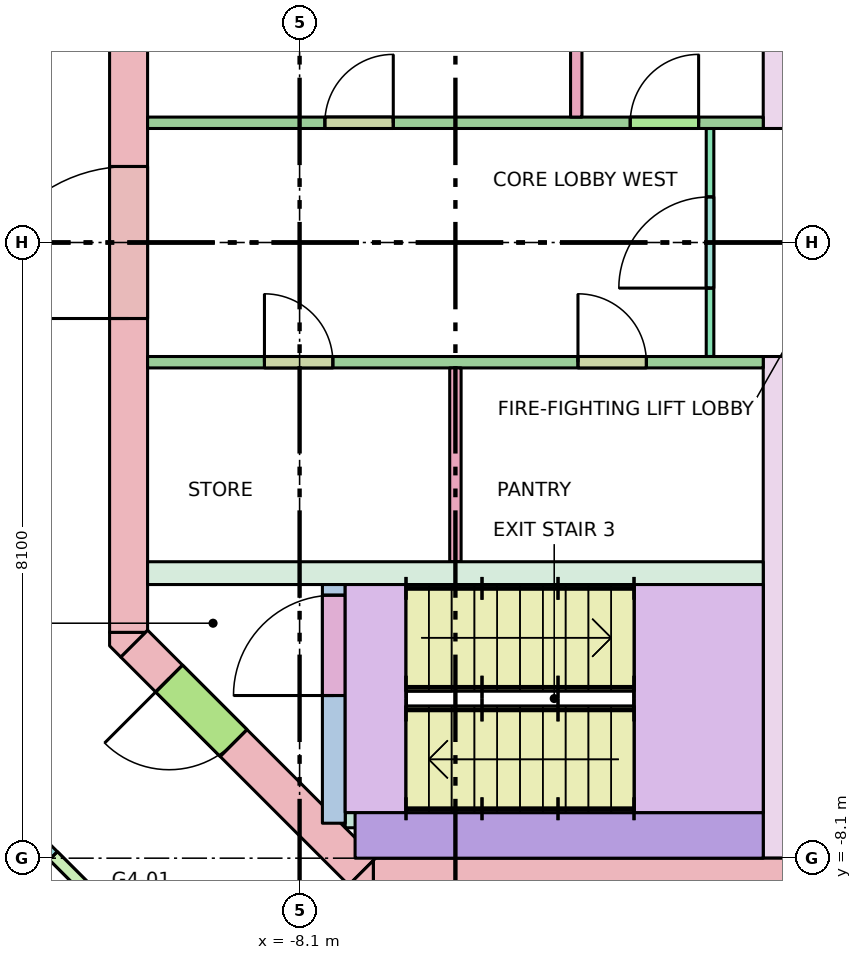
"""IFC4 building model, lengths in metres.
Left out: names, types, materials, properties, quantities, classifications, styles, units other than length and angle.
Written with IfcOpenShell. Run it as: python <this file> out.ifc"""

import sys

from ifc_helpers import new_model, si_unit, direction, frame, frame_2d, origin, place, context, subcontext, project, spatial, polyline, rectangle, outline, extrude, element, fill, save


model = new_model("IFC4")
c1 = context("Model", 3, precision=1e-05, world=origin(), true_north=direction((0.0, 1.0)))
c2 = subcontext(c1, "Body", "Model", "MODEL_VIEW")
j1 = project(units=[si_unit("LENGTHUNIT", "METRE"), si_unit("PLANEANGLEUNIT", "RADIAN")], contexts=[c1])
p1 = place(None, origin())
s1 = spatial("IfcSite", under=j1, at=p1, CompositionType="ELEMENT")
p2 = place(p1, origin())
s2 = spatial("IfcBuilding", under=s1, at=p2, CompositionType="ELEMENT")
p3 = place(p2, frame((0.0, 0.0, 276.0)))
s3 = spatial("IfcBuildingStorey", under=s2, at=p3, CompositionType="ELEMENT", Elevation=276.0)
p4 = place(p3, frame((-7.13, -8.35, -0.28), z_axis=(0.0, 0.0, 1.0), x_axis=(1.0, 0.0, 0.0)))
e1 = element("IfcWall", 1, at=p4, inside=s3, PredefinedType="SHEAR", context=c2, shape_type="SweptSolid", body=[
    extrude(rectangle(XDim=14.26, YDim=0.5, at=frame_2d((7.13, 0.0))), origin(), (0.0, 0.0, 1.0), 7.4),
])
p5 = place(p4, frame((8.08, 0.0, 0.28)))
e2 = element("IfcOpeningElement", 2, at=p5, cuts=e1, PredefinedType="OPENING", context=c2, shape_type="SweptSolid", body=[
    extrude(rectangle(XDim=0.7, YDim=2.1, at=frame_2d((0.35, 1.05))), frame((0.0, 0.26, 0.0), z_axis=(0.0, -1.0, 0.0), x_axis=(1.0, 0.0, 0.0)), (0.0, 0.0, 1.0), 0.52),
])
p6 = place(p4, frame((6.205, 0.0, 0.28)))
e3 = element("IfcOpeningElement", 3, at=p6, cuts=e1, PredefinedType="OPENING", context=c2, shape_type="SweptSolid", body=[
    extrude(rectangle(XDim=0.9, YDim=2.1, at=frame_2d((0.45, 1.05))), frame((0.0, 0.26, 0.0), z_axis=(0.0, -1.0, 0.0), x_axis=(1.0, 0.0, 0.0)), (0.0, 0.0, 1.0), 0.52),
])
p7 = place(p4, frame((10.667, 0.0, 0.28)))
e4 = element("IfcOpeningElement", 4, at=p7, cuts=e1, PredefinedType="OPENING", context=c2, shape_type="SweptSolid", body=[
    extrude(rectangle(XDim=0.9, YDim=2.1, at=frame_2d((0.45, 1.05))), frame((0.0, 0.26, 0.0), z_axis=(0.0, -1.0, 0.0), x_axis=(1.0, 0.0, 0.0)), (0.0, 0.0, 1.0), 0.52),
])
p8 = place(p3, frame((-10.35, -5.13, -0.28), z_axis=(0.0, 0.0, 1.0), x_axis=(0.0, 1.0, 0.0)))
e5 = element("IfcWall", 5, at=p8, inside=s3, PredefinedType="SHEAR", context=c2, shape_type="SweptSolid", body=[
    extrude(rectangle(XDim=10.26, YDim=0.5, at=frame_2d((5.13, 0.0))), origin(), (0.0, 0.0, 1.0), 7.4),
])
p9 = place(p8, frame((4.13, 0.0, 0.28)))
e6 = element("IfcOpeningElement", 6, at=p9, cuts=e5, PredefinedType="OPENING", context=c2, shape_type="SweptSolid", body=[
    extrude(rectangle(XDim=2.0, YDim=2.1, at=frame_2d((1.0, 1.05))), frame((0.0, 0.26, 0.0), z_axis=(0.0, -1.0, 0.0), x_axis=(1.0, 0.0, 0.0)), (0.0, 0.0, 1.0), 0.52),
])
p10 = place(p3, frame((-7.277, -8.277, -0.28), z_axis=(0.0, 0.0, 1.0), x_axis=(-0.707106781187, 0.707106781187, 0.0)))
e7 = element("IfcWall", 7, at=p10, inside=s3, PredefinedType="SHEAR", context=c2, shape_type="SweptSolid", body=[
    extrude(rectangle(XDim=4.243, YDim=0.5, at=frame_2d((2.121, 0.0))), origin(), (0.0, 0.0, 1.0), 7.4),
])
p11 = place(p10, frame((2.393, 0.0, 0.28)))
e8 = element("IfcOpeningElement", 8, at=p11, cuts=e7, PredefinedType="OPENING", context=c2, shape_type="SweptSolid", body=[
    extrude(rectangle(XDim=1.2, YDim=2.1, at=frame_2d((0.6, 1.05))), frame((0.0, 0.26, 0.0), z_axis=(0.0, -1.0, 0.0), x_axis=(1.0, 0.0, 0.0)), (0.0, 0.0, 1.0), 0.52),
])
p12 = place(p3, frame((0.0, 0.0, -0.28)))
e9 = element("IfcWall", 9, at=p12, inside=s3, PredefinedType="SHEAR", context=c2, shape_type="SweptSolid", body=[
    extrude(outline(polyline([(-7.307, -8.6), (-7.454, -8.454), (-7.13, -8.13), (-7.13, -8.6), (-7.307, -8.6)])), origin(), (0.0, 0.0, 1.0), 7.4),
])
p13 = place(p3, frame((0.0, 0.0, -0.28)))
e10 = element("IfcWall", 10, at=p13, inside=s3, PredefinedType="SHEAR", context=c2, shape_type="SweptSolid", body=[
    extrude(outline(polyline([(-10.6, -5.307), (-10.6, -5.13), (-10.13, -5.13), (-10.454, -5.454), (-10.6, -5.307)])), origin(), (0.0, 0.0, 1.0), 7.4),
])
p14 = place(p3, frame((-10.1, -4.35, 0.0), z_axis=(0.0, 0.0, 1.0), x_axis=(1.0, 0.0, 0.0)))
e11 = element("IfcWall", 11, at=p14, inside=s3, PredefinedType="SOLIDWALL", context=c2, shape_type="SweptSolid", body=[
    extrude(rectangle(XDim=8.1, YDim=0.3, at=frame_2d((4.05, 0.0))), origin(), (0.0, 0.0, 1.0), 7.12),
])
for number, where, z_axis, x_axis in (
    (12, (-1.85, 1.5, 0.0), (0.0, 0.0, 1.0), (0.0, 1.0, 0.0)),
    (13, (-1.85, -8.1, 0.0), (0.0, 0.0, 1.0), (0.0, 1.0, 0.0)),
):
    element("IfcWall", number, at=place(p3, frame(where, z_axis=z_axis, x_axis=x_axis)), inside=s3, PredefinedType="SHEAR", context=c2, shape_type="SweptSolid", body=[
        extrude(rectangle(XDim=6.6, YDim=0.3, at=frame_2d((3.3, 0.0))), origin(), (0.0, 0.0, 1.0), 7.12),
    ])
p15 = place(p3, frame((-7.65, -7.64, 0.0), z_axis=(0.0, 0.0, 1.0), x_axis=(0.0, 1.0, 0.0)))
e14 = element("IfcWall", 14, at=p15, inside=s3, PredefinedType="SHEAR", context=c2, shape_type="SweptSolid", body=[
    extrude(rectangle(XDim=3.14, YDim=0.3, at=frame_2d((1.57, 0.0))), origin(), (0.0, 0.0, 1.0), 7.12),
])
p16 = place(p15, frame((1.68, 0.0, 0.0)))
e15 = element("IfcOpeningElement", 15, at=p16, cuts=e14, PredefinedType="OPENING", context=c2, shape_type="SweptSolid", body=[
    extrude(rectangle(XDim=1.32, YDim=2.1, at=frame_2d((0.66, 1.05))), frame((0.0, 0.16, 0.0), z_axis=(0.0, -1.0, 0.0), x_axis=(1.0, 0.0, 0.0)), (0.0, 0.0, 1.0), 0.32),
])
p17 = place(p3, frame((-7.5, -7.6, 0.0), z_axis=(0.0, 0.0, 1.0), x_axis=(1.0, 0.0, 0.0)))
e16 = element("IfcWall", 16, at=p17, inside=s3, PredefinedType="SHEAR", context=c2, shape_type="SweptSolid", body=[
    extrude(rectangle(XDim=0.6, YDim=0.2, at=frame_2d((0.3, 0.0))), origin(), (0.0, 0.0, 1.0), 7.12),
])
p18 = place(p3, frame((-7.37, -7.8, 0.0), z_axis=(0.0, 0.0, 1.0), x_axis=(1.0, 0.0, 0.0)))
e17 = element("IfcWall", 17, at=p18, inside=s3, PredefinedType="SHEAR", context=c2, shape_type="SweptSolid", body=[
    extrude(rectangle(XDim=5.37, YDim=0.6, at=frame_2d((2.685, 0.0))), origin(), (0.0, 0.0, 1.0), 7.12),
])
p19 = place(p3, frame((-2.7, -1.5, 0.0), z_axis=(0.0, 0.0, 1.0), x_axis=(0.0, 1.0, 0.0)))
e18 = element("IfcWall", 18, at=p19, inside=s3, PredefinedType="PARTITIONING", context=c2, shape_type="SweptSolid", body=[
    extrude(rectangle(XDim=3.0, YDim=0.1, at=frame_2d((1.5, 0.0))), origin(), (0.0, 0.0, 1.0), 7.12),
])
p20 = place(p19, frame((0.9, 0.0, 0.0)))
e19 = element("IfcOpeningElement", 19, at=p20, cuts=e18, PredefinedType="OPENING", context=c2, shape_type="SweptSolid", body=[
    extrude(rectangle(XDim=1.2, YDim=2.1, at=frame_2d((0.6, 1.05))), frame((0.0, 0.06, 0.0), z_axis=(0.0, -1.0, 0.0), x_axis=(1.0, 0.0, 0.0)), (0.0, 0.0, 1.0), 0.12),
])
for number, where, z_axis, x_axis in (
    (20, (-4.46, 1.65, 0.0), (0.0, 0.0, 1.0), (0.0, 1.0, 0.0)),
    (21, (-6.05, -4.2, 0.0), (0.0, 0.0, 1.0), (0.0, 1.0, 0.0)),
):
    element("IfcWall", number, at=place(p3, frame(where, z_axis=z_axis, x_axis=x_axis)), inside=s3, PredefinedType="PARTITIONING", context=c2, shape_type="SweptSolid", body=[
        extrude(rectangle(XDim=2.55, YDim=0.15, at=frame_2d((1.275, 0.0))), origin(), (0.0, 0.0, 1.0), 7.12),
    ])
p21 = place(p3, frame((-10.1, 1.575, 0.0), z_axis=(0.0, 0.0, 1.0), x_axis=(1.0, 0.0, 0.0)))
e22 = element("IfcWall", 22, at=p21, inside=s3, PredefinedType="PARTITIONING", context=c2, shape_type="SweptSolid", body=[
    extrude(rectangle(XDim=8.1, YDim=0.15, at=frame_2d((4.05, 0.0))), origin(), (0.0, 0.0, 1.0), 7.12),
])
p22 = place(p21, frame((2.333, 0.0, 0.0)))
e23 = element("IfcOpeningElement", 23, at=p22, cuts=e22, PredefinedType="OPENING", context=c2, shape_type="SweptSolid", body=[
    extrude(rectangle(XDim=0.9, YDim=2.1, at=frame_2d((0.45, 1.05))), frame((0.0, 0.085, 0.0), z_axis=(0.0, -1.0, 0.0), x_axis=(1.0, 0.0, 0.0)), (0.0, 0.0, 1.0), 0.17),
])
p23 = place(p21, frame((6.35, 0.0, 0.0)))
e24 = element("IfcOpeningElement", 24, at=p23, cuts=e22, PredefinedType="OPENING", context=c2, shape_type="SweptSolid", body=[
    extrude(rectangle(XDim=0.9, YDim=2.1, at=frame_2d((0.45, 1.05))), frame((0.0, 0.085, 0.0), z_axis=(0.0, -1.0, 0.0), x_axis=(1.0, 0.0, 0.0)), (0.0, 0.0, 1.0), 0.17),
])
p24 = place(p3, frame((-10.1, -1.575, 0.0), z_axis=(0.0, 0.0, 1.0), x_axis=(1.0, 0.0, 0.0)))
e25 = element("IfcWall", 25, at=p24, inside=s3, PredefinedType="PARTITIONING", context=c2, shape_type="SweptSolid", body=[
    extrude(rectangle(XDim=8.1, YDim=0.15, at=frame_2d((4.05, 0.0))), origin(), (0.0, 0.0, 1.0), 7.12),
])
p25 = place(p24, frame((1.538, 0.0, 0.0)))
e26 = element("IfcOpeningElement", 26, at=p25, cuts=e25, PredefinedType="OPENING", context=c2, shape_type="SweptSolid", body=[
    extrude(rectangle(XDim=0.9, YDim=2.1, at=frame_2d((0.45, 1.05))), frame((0.0, 0.085, 0.0), z_axis=(0.0, -1.0, 0.0), x_axis=(1.0, 0.0, 0.0)), (0.0, 0.0, 1.0), 0.17),
])
p26 = place(p24, frame((5.663, 0.0, 0.0)))
e27 = element("IfcOpeningElement", 27, at=p26, cuts=e25, PredefinedType="OPENING", context=c2, shape_type="SweptSolid", body=[
    extrude(rectangle(XDim=0.9, YDim=2.1, at=frame_2d((0.45, 1.05))), frame((0.0, 0.085, 0.0), z_axis=(0.0, -1.0, 0.0), x_axis=(1.0, 0.0, 0.0)), (0.0, 0.0, 1.0), 0.17),
])
p27 = place(p3, frame((-8.369, -11.038, 0.0), z_axis=(0.0, 0.0, 1.0), x_axis=(-0.707106781187, 0.707106781187, 0.0)))
e28 = element("IfcWall", 28, at=p27, inside=s3, PredefinedType="PARTITIONING", context=c2, shape_type="SweptSolid", body=[
    extrude(rectangle(XDim=6.602, YDim=0.15, at=frame_2d((3.301, 0.0))), origin(), (0.0, 0.0, 1.0), 6.27),
])
p28 = place(p27, frame((2.401, 0.0, 0.0)))
e29 = element("IfcOpeningElement", 29, at=p28, cuts=e28, PredefinedType="OPENING", context=c2, shape_type="SweptSolid", body=[
    extrude(rectangle(XDim=1.8, YDim=2.1, at=frame_2d((0.9, 1.05))), frame((0.0, 0.085, 0.0), z_axis=(0.0, -1.0, 0.0), x_axis=(1.0, 0.0, 0.0)), (0.0, 0.0, 1.0), 0.17),
])
p29 = place(p16, origin())
e30 = element("IfcDoor", 30, at=p29, inside=s3, OperationType="DOUBLE_DOOR_SINGLE_SWING", PredefinedType="DOOR", context=c2, shape_type="SweptSolid", body=[
    extrude(rectangle(XDim=1.32, YDim=2.1, at=frame_2d((0.66, 1.05))), frame((0.0, 0.025, 0.0), z_axis=(0.0, -1.0, 0.0), x_axis=(1.0, 0.0, 0.0)), (0.0, 0.0, 1.0), 0.05),
])
fill(e15, e30)
p30 = place(p11, origin())
e31 = element("IfcDoor", 31, at=p30, inside=s3, OperationType="SINGLE_SWING_RIGHT", PredefinedType="DOOR", context=c2, shape_type="SweptSolid", body=[
    extrude(rectangle(XDim=1.2, YDim=2.1, at=frame_2d((0.6, 1.05))), frame((0.0, 0.025, 0.0), z_axis=(0.0, -1.0, 0.0), x_axis=(1.0, 0.0, 0.0)), (0.0, 0.0, 1.0), 0.05),
])
fill(e8, e31)
p31 = place(p9, origin())
e32 = element("IfcDoor", 32, at=p31, inside=s3, OperationType="DOUBLE_DOOR_SINGLE_SWING", PredefinedType="DOOR", context=c2, shape_type="SweptSolid", body=[
    extrude(rectangle(XDim=2.0, YDim=2.1, at=frame_2d((1.0, 1.05))), frame((0.0, 0.025, 0.0), z_axis=(0.0, -1.0, 0.0), x_axis=(1.0, 0.0, 0.0)), (0.0, 0.0, 1.0), 0.05),
])
fill(e6, e32)
p32 = place(p20, origin())
e33 = element("IfcDoor", 33, at=p32, inside=s3, OperationType="SINGLE_SWING_LEFT", PredefinedType="DOOR", context=c2, shape_type="SweptSolid", body=[
    extrude(rectangle(XDim=1.2, YDim=2.1, at=frame_2d((0.6, 1.05))), frame((0.0, 0.025, 0.0), z_axis=(0.0, -1.0, 0.0), x_axis=(1.0, 0.0, 0.0)), (0.0, 0.0, 1.0), 0.05),
])
fill(e19, e33)
p33 = place(p22, origin())
e34 = element("IfcDoor", 34, at=p33, inside=s3, OperationType="SINGLE_SWING_RIGHT", PredefinedType="DOOR", context=c2, shape_type="SweptSolid", body=[
    extrude(rectangle(XDim=0.9, YDim=2.1, at=frame_2d((0.45, 1.05))), frame((0.0, 0.025, 0.0), z_axis=(0.0, -1.0, 0.0), x_axis=(1.0, 0.0, 0.0)), (0.0, 0.0, 1.0), 0.05),
])
fill(e23, e34)
p34 = place(p23, origin())
e35 = element("IfcDoor", 35, at=p34, inside=s3, OperationType="SINGLE_SWING_RIGHT", PredefinedType="DOOR", context=c2, shape_type="SweptSolid", body=[
    extrude(rectangle(XDim=0.9, YDim=2.1, at=frame_2d((0.45, 1.05))), frame((0.0, 0.025, 0.0), z_axis=(0.0, -1.0, 0.0), x_axis=(1.0, 0.0, 0.0)), (0.0, 0.0, 1.0), 0.05),
])
fill(e24, e35)
p35 = place(p25, origin())
e36 = element("IfcDoor", 36, at=p35, inside=s3, OperationType="SINGLE_SWING_LEFT", PredefinedType="DOOR", context=c2, shape_type="SweptSolid", body=[
    extrude(rectangle(XDim=0.9, YDim=2.1, at=frame_2d((0.45, 1.05))), frame((0.0, 0.025, 0.0), z_axis=(0.0, -1.0, 0.0), x_axis=(1.0, 0.0, 0.0)), (0.0, 0.0, 1.0), 0.05),
])
fill(e26, e36)
p36 = place(p26, origin())
e37 = element("IfcDoor", 37, at=p36, inside=s3, OperationType="SINGLE_SWING_LEFT", PredefinedType="DOOR", context=c2, shape_type="SweptSolid", body=[
    extrude(rectangle(XDim=0.9, YDim=2.1, at=frame_2d((0.45, 1.05))), frame((0.0, 0.025, 0.0), z_axis=(0.0, -1.0, 0.0), x_axis=(1.0, 0.0, 0.0)), (0.0, 0.0, 1.0), 0.05),
])
fill(e27, e37)
p37 = place(p28, origin())
e38 = element("IfcDoor", 38, at=p37, inside=s3, OperationType="DOUBLE_DOOR_SINGLE_SWING", PredefinedType="DOOR", context=c2, shape_type="SweptSolid", body=[
    extrude(rectangle(XDim=1.8, YDim=2.1, at=frame_2d((0.9, 1.05))), frame((0.0, 0.025, 0.0), z_axis=(0.0, -1.0, 0.0), x_axis=(1.0, 0.0, 0.0)), (0.0, 0.0, 1.0), 0.05),
])
fill(e29, e38)
save(model, sys.argv[1])
